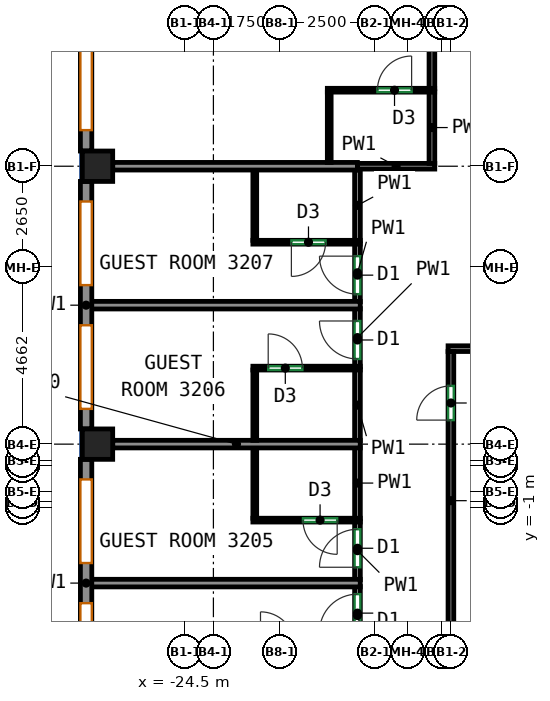
"""IFC4 building model, lengths in metres.
Left out: names, types, materials, properties, quantities, classifications, styles, units other than length and angle.
Written with IfcOpenShell. Run it as: python <this file> out.ifc"""

import sys

from ifc_helpers import new_model, si_unit, direction, frame, frame_2d, origin, origin_2d, place, context, subcontext, project, spatial, rectangle, extrude, source, transform, mapped, element, fill, save


model = new_model("IFC4")
c1 = context("Model", 3, precision=1e-05, world=origin(), true_north=direction((0.0, 1.0)))
c2 = subcontext(c1, "Body", "Model", "MODEL_VIEW")
j1 = project(units=[si_unit("LENGTHUNIT", "METRE"), si_unit("PLANEANGLEUNIT", "RADIAN")], contexts=[c1])
p1 = place(None, origin())
s1 = spatial("IfcSite", under=j1, at=p1, CompositionType="ELEMENT")
p2 = place(p1, origin())
s2 = spatial("IfcBuilding", under=s1, at=p2, CompositionType="ELEMENT")
p3 = place(p2, frame((0.0, 0.0, 143.9)))
s3 = spatial("IfcBuildingStorey", under=s2, at=p3, CompositionType="ELEMENT", Elevation=143.9)
m1 = source(origin(), c2, "Body", "SweptSolid", [
    extrude(rectangle(XDim=0.8, YDim=0.8, at=origin_2d()), origin(), (0.0, 0.0, 1.0), 3.12),
])
for number, where, z_axis, x_axis in (
    (1, (-26.8, 0.688, 0.0), (0.0, 0.0, 1.0), (1.0, 0.0, 0.0)),
    (2, (-26.8, 8.0, 0.0), (0.0, 0.0, 1.0), (1.0, 0.0, 0.0)),
):
    element("IfcColumn", number, at=place(p3, frame(where, z_axis=z_axis, x_axis=x_axis)), inside=s3, PredefinedType="COLUMN", context=c2, shape_type="MappedRepresentation", body=[
        mapped(m1, transform((0.0, 0.0, 0.0))),
    ])
m2 = source(origin(), c2, "Body", "SweptSolid", [
    extrude(rectangle(XDim=13.2, YDim=0.3, at=frame_2d((6.6, 0.0))), origin(), (0.0, 0.0, 1.0), 3.12),
])
p4 = place(p3, frame((-27.1, 21.6, 0.0), z_axis=(0.0, 0.0, 1.0), x_axis=(0.0, -1.0, 0.0)))
e3 = element("IfcWall", 3, at=p4, inside=s3, PredefinedType="SOLIDWALL", context=c2, shape_type="MappedRepresentation", body=[
    mapped(m2, transform((0.0, 0.0, 0.0))),
])
p5 = place(p4, frame((0.55, 0.0, 0.85)))
e4 = element("IfcOpeningElement", 4, at=p5, cuts=e3, PredefinedType="OPENING", context=c2, shape_type="SweptSolid", body=[
    extrude(rectangle(XDim=2.2, YDim=1.95, at=frame_2d((1.1, 0.975))), frame((0.0, 0.16, 0.0), z_axis=(0.0, -1.0, 0.0), x_axis=(1.0, 0.0, 0.0)), (0.0, 0.0, 1.0), 0.32),
])
p6 = place(p4, frame((3.85, 0.0, 0.85)))
e5 = element("IfcOpeningElement", 5, at=p6, cuts=e3, PredefinedType="OPENING", context=c2, shape_type="SweptSolid", body=[
    extrude(rectangle(XDim=2.2, YDim=1.95, at=frame_2d((1.1, 0.975))), frame((0.0, 0.16, 0.0), z_axis=(0.0, -1.0, 0.0), x_axis=(1.0, 0.0, 0.0)), (0.0, 0.0, 1.0), 0.32),
])
p7 = place(p4, frame((7.15, 0.0, 0.85)))
e6 = element("IfcOpeningElement", 6, at=p7, cuts=e3, PredefinedType="OPENING", context=c2, shape_type="SweptSolid", body=[
    extrude(rectangle(XDim=2.2, YDim=1.95, at=frame_2d((1.1, 0.975))), frame((0.0, 0.16, 0.0), z_axis=(0.0, -1.0, 0.0), x_axis=(1.0, 0.0, 0.0)), (0.0, 0.0, 1.0), 0.32),
])
p8 = place(p4, frame((10.45, 0.0, 0.85)))
e7 = element("IfcOpeningElement", 7, at=p8, cuts=e3, PredefinedType="OPENING", context=c2, shape_type="SweptSolid", body=[
    extrude(rectangle(XDim=2.2, YDim=1.95, at=frame_2d((1.1, 0.975))), frame((0.0, 0.16, 0.0), z_axis=(0.0, -1.0, 0.0), x_axis=(1.0, 0.0, 0.0)), (0.0, 0.0, 1.0), 0.32),
])
m3 = source(origin(), c2, "Body", "SweptSolid", [
    extrude(rectangle(XDim=6.513, YDim=0.3, at=frame_2d((3.256, 0.0))), origin(), (0.0, 0.0, 1.0), 3.12),
])
p9 = place(p3, frame((-27.1, 7.6, 0.0), z_axis=(0.0, 0.0, 1.0), x_axis=(0.0, -1.0, 0.0)))
e8 = element("IfcWall", 8, at=p9, inside=s3, PredefinedType="SOLIDWALL", context=c2, shape_type="MappedRepresentation", body=[
    mapped(m3, transform((0.0, 0.0, 0.0))),
])
p10 = place(p9, frame((0.528, 0.0, 0.85)))
e9 = element("IfcOpeningElement", 9, at=p10, cuts=e8, PredefinedType="OPENING", context=c2, shape_type="SweptSolid", body=[
    extrude(rectangle(XDim=2.2, YDim=1.95, at=frame_2d((1.1, 0.975))), frame((0.0, 0.16, 0.0), z_axis=(0.0, -1.0, 0.0), x_axis=(1.0, 0.0, 0.0)), (0.0, 0.0, 1.0), 0.32),
])
p11 = place(p9, frame((3.784, 0.0, 0.85)))
e10 = element("IfcOpeningElement", 10, at=p11, cuts=e8, PredefinedType="OPENING", context=c2, shape_type="SweptSolid", body=[
    extrude(rectangle(XDim=2.2, YDim=1.95, at=frame_2d((1.1, 0.975))), frame((0.0, 0.16, 0.0), z_axis=(0.0, -1.0, 0.0), x_axis=(1.0, 0.0, 0.0)), (0.0, 0.0, 1.0), 0.32),
])
p12 = place(p3, frame((-27.1, 0.288, 0.0), z_axis=(0.0, 0.0, 1.0), x_axis=(0.0, -1.0, 0.0)))
e11 = element("IfcWall", 11, at=p12, inside=s3, PredefinedType="SOLIDWALL", context=c2, shape_type="MappedRepresentation", body=[
    mapped(m3, transform((0.0, 0.0, 0.0))),
])
p13 = place(p12, frame((0.528, 0.0, 0.85)))
e12 = element("IfcOpeningElement", 12, at=p13, cuts=e11, PredefinedType="OPENING", context=c2, shape_type="SweptSolid", body=[
    extrude(rectangle(XDim=2.2, YDim=1.95, at=frame_2d((1.1, 0.975))), frame((0.0, 0.16, 0.0), z_axis=(0.0, -1.0, 0.0), x_axis=(1.0, 0.0, 0.0)), (0.0, 0.0, 1.0), 0.32),
])
p14 = place(p12, frame((3.784, 0.0, 0.85)))
e13 = element("IfcOpeningElement", 13, at=p14, cuts=e11, PredefinedType="OPENING", context=c2, shape_type="SweptSolid", body=[
    extrude(rectangle(XDim=2.2, YDim=1.95, at=frame_2d((1.1, 0.975))), frame((0.0, 0.16, 0.0), z_axis=(0.0, -1.0, 0.0), x_axis=(1.0, 0.0, 0.0)), (0.0, 0.0, 1.0), 0.32),
])
p15 = place(p3, frame((-19.959, -4.585, 0.0), z_axis=(0.0, 0.0, 1.0), x_axis=(0.0, 1.0, 0.0)))
e14 = element("IfcWall", 14, at=p15, inside=s3, PredefinedType="PARTITIONING", context=c2, shape_type="SweptSolid", body=[
    extrude(rectangle(XDim=1.526, YDim=0.15, at=frame_2d((0.763, 0.0))), origin(), (0.0, 0.0, 1.0), 3.12),
])
p16 = place(p15, frame((0.326, 0.0, 0.0)))
e15 = element("IfcOpeningElement", 15, at=p16, cuts=e14, PredefinedType="OPENING", context=c2, shape_type="SweptSolid", body=[
    extrude(rectangle(XDim=1.0, YDim=2.1, at=frame_2d((0.5, 1.05))), frame((0.0, 0.085, 0.0), z_axis=(0.0, -1.0, 0.0), x_axis=(1.0, 0.0, 0.0)), (0.0, 0.0, 1.0), 0.17),
])
p17 = place(p3, frame((-19.959, -2.879, 0.0), z_axis=(0.0, 0.0, 1.0), x_axis=(0.0, 1.0, 0.0)))
e16 = element("IfcWall", 16, at=p17, inside=s3, PredefinedType="PARTITIONING", context=c2, shape_type="SweptSolid", body=[
    extrude(rectangle(XDim=1.527, YDim=0.15, at=frame_2d((0.763, 0.0))), origin(), (0.0, 0.0, 1.0), 3.12),
])
p18 = place(p17, frame((0.327, 0.0, 0.0)))
e17 = element("IfcOpeningElement", 17, at=p18, cuts=e16, PredefinedType="OPENING", context=c2, shape_type="SweptSolid", body=[
    extrude(rectangle(XDim=1.0, YDim=2.1, at=frame_2d((0.5, 1.05))), frame((0.0, 0.085, 0.0), z_axis=(0.0, -1.0, 0.0), x_axis=(1.0, 0.0, 0.0)), (0.0, 0.0, 1.0), 0.17),
])
p19 = place(p3, frame((-19.959, -1.272, 0.0), z_axis=(0.0, 0.0, 1.0), x_axis=(0.0, 1.0, 0.0)))
e18 = element("IfcWall", 18, at=p19, inside=s3, PredefinedType="PARTITIONING", context=c2, shape_type="SweptSolid", body=[
    extrude(rectangle(XDim=1.87, YDim=0.15, at=frame_2d((0.935, 0.0))), origin(), (0.0, 0.0, 1.0), 3.12),
])
p20 = place(p3, frame((-19.959, 2.728, 0.0), z_axis=(0.0, 0.0, 1.0), x_axis=(0.0, 1.0, 0.0)))
e19 = element("IfcWall", 19, at=p20, inside=s3, PredefinedType="PARTITIONING", context=c2, shape_type="SweptSolid", body=[
    extrude(rectangle(XDim=1.526, YDim=0.15, at=frame_2d((0.763, 0.0))), origin(), (0.0, 0.0, 1.0), 3.12),
])
p21 = place(p20, frame((0.2, 0.0, 0.0)))
e20 = element("IfcOpeningElement", 20, at=p21, cuts=e19, PredefinedType="OPENING", context=c2, shape_type="SweptSolid", body=[
    extrude(rectangle(XDim=1.0, YDim=2.1, at=frame_2d((0.5, 1.05))), frame((0.0, 0.085, 0.0), z_axis=(0.0, -1.0, 0.0), x_axis=(1.0, 0.0, 0.0)), (0.0, 0.0, 1.0), 0.17),
])
p22 = place(p3, frame((-19.959, 0.778, 0.0), z_axis=(0.0, 0.0, 1.0), x_axis=(0.0, 1.0, 0.0)))
e21 = element("IfcWall", 21, at=p22, inside=s3, PredefinedType="PARTITIONING", context=c2, shape_type="SweptSolid", body=[
    extrude(rectangle(XDim=1.87, YDim=0.15, at=frame_2d((0.935, 0.0))), origin(), (0.0, 0.0, 1.0), 3.12),
])
p23 = place(p3, frame((-19.959, 4.434, 0.0), z_axis=(0.0, 0.0, 1.0), x_axis=(0.0, 1.0, 0.0)))
e22 = element("IfcWall", 22, at=p23, inside=s3, PredefinedType="PARTITIONING", context=c2, shape_type="SweptSolid", body=[
    extrude(rectangle(XDim=1.526, YDim=0.15, at=frame_2d((0.763, 0.0))), origin(), (0.0, 0.0, 1.0), 3.12),
])
p24 = place(p23, frame((0.2, 0.0, 0.0)))
e23 = element("IfcOpeningElement", 23, at=p24, cuts=e22, PredefinedType="OPENING", context=c2, shape_type="SweptSolid", body=[
    extrude(rectangle(XDim=1.0, YDim=2.1, at=frame_2d((0.5, 1.05))), frame((0.0, 0.085, 0.0), z_axis=(0.0, -1.0, 0.0), x_axis=(1.0, 0.0, 0.0)), (0.0, 0.0, 1.0), 0.17),
])
p25 = place(p3, frame((-19.959, 6.04, 0.0), z_axis=(0.0, 0.0, 1.0), x_axis=(0.0, 1.0, 0.0)))
e24 = element("IfcWall", 24, at=p25, inside=s3, PredefinedType="PARTITIONING", context=c2, shape_type="SweptSolid", body=[
    extrude(rectangle(XDim=1.86, YDim=0.15, at=frame_2d((0.93, 0.0))), origin(), (0.0, 0.0, 1.0), 3.12),
])
p26 = place(p3, frame((-18.0, 10.04, 0.0), z_axis=(0.0, 0.0, 1.0), x_axis=(0.0, 1.0, 0.0)))
e25 = element("IfcWall", 25, at=p26, inside=s3, PredefinedType="PARTITIONING", context=c2, shape_type="SweptSolid", body=[
    extrude(rectangle(XDim=11.885, YDim=0.15, at=frame_2d((5.942, 0.0))), origin(), (0.0, 0.0, 1.0), 3.12),
])
p27 = place(p26, frame((1.309, 0.0, 0.0)))
e26 = element("IfcOpeningElement", 26, at=p27, cuts=e25, PredefinedType="OPENING", context=c2, shape_type="SweptSolid", body=[
    extrude(rectangle(XDim=1.0, YDim=2.1, at=frame_2d((0.5, 1.05))), frame((0.0, 0.085, 0.0), z_axis=(0.0, -1.0, 0.0), x_axis=(1.0, 0.0, 0.0)), (0.0, 0.0, 1.0), 0.17),
])
p28 = place(p3, frame((-17.925, 8.0, 0.0), z_axis=(0.0, 0.0, 1.0), x_axis=(-1.0, 0.0, 0.0)))
e27 = element("IfcWall", 27, at=p28, inside=s3, PredefinedType="PARTITIONING", context=c2, shape_type="SweptSolid", body=[
    extrude(rectangle(XDim=2.034, YDim=0.15, at=frame_2d((1.017, 0.0))), origin(), (0.0, 0.0, 1.0), 3.12),
])
p29 = place(p3, frame((-18.0, 8.075, 0.0), z_axis=(0.0, 0.0, 1.0), x_axis=(0.0, 1.0, 0.0)))
e28 = element("IfcWall", 28, at=p29, inside=s3, PredefinedType="PARTITIONING", context=c2, shape_type="SweptSolid", body=[
    extrude(rectangle(XDim=1.885, YDim=0.15, at=frame_2d((0.942, 0.0))), origin(), (0.0, 0.0, 1.0), 3.12),
])
p30 = place(p3, frame((-17.575, 3.2, 0.0), z_axis=(0.0, 0.0, 1.0), x_axis=(1.0, 0.0, 0.0)))
e29 = element("IfcWall", 29, at=p30, inside=s3, PredefinedType="PARTITIONING", context=c2, shape_type="SweptSolid", body=[
    extrude(rectangle(XDim=3.85, YDim=0.15, at=frame_2d((1.925, 0.0))), origin(), (0.0, 0.0, 1.0), 3.12),
])
p31 = place(p3, frame((-17.5, -4.725, 0.0), z_axis=(0.0, 0.0, 1.0), x_axis=(0.0, 1.0, 0.0)))
e30 = element("IfcWall", 30, at=p31, inside=s3, PredefinedType="PARTITIONING", context=c2, shape_type="SweptSolid", body=[
    extrude(rectangle(XDim=7.85, YDim=0.15, at=frame_2d((3.925, 0.0))), origin(), (0.0, 0.0, 1.0), 3.12),
])
p32 = place(p31, frame((6.045, 0.0, 0.0)))
e31 = element("IfcOpeningElement", 31, at=p32, cuts=e30, PredefinedType="OPENING", context=c2, shape_type="SweptSolid", body=[
    extrude(rectangle(XDim=0.9, YDim=2.1, at=frame_2d((0.45, 1.05))), frame((0.0, 0.085, 0.0), z_axis=(0.0, -1.0, 0.0), x_axis=(1.0, 0.0, 0.0)), (0.0, 0.0, 1.0), 0.17),
])
p33 = place(p3, frame((-19.886, -2.969, 0.0), z_axis=(0.0, 0.0, 1.0), x_axis=(-1.0, 0.0, 0.0)))
e32 = element("IfcWall", 32, at=p33, inside=s3, PredefinedType="PARTITIONING", context=c2, shape_type="SweptSolid", body=[
    extrude(rectangle(XDim=7.114, YDim=0.2, at=frame_2d((3.557, 0.0))), origin(), (0.0, 0.0, 1.0), 3.12),
])
p34 = place(p3, frame((-19.886, -1.312, 0.0), z_axis=(0.0, 0.0, 1.0), x_axis=(-1.0, 0.0, 0.0)))
e33 = element("IfcWall", 33, at=p34, inside=s3, PredefinedType="PARTITIONING", context=c2, shape_type="SweptSolid", body=[
    extrude(rectangle(XDim=2.825, YDim=0.1, at=frame_2d((1.413, 0.0))), origin(), (0.0, 0.0, 1.0), 3.12),
])
p35 = place(p34, frame((0.607, 0.0, 0.0)))
e34 = element("IfcOpeningElement", 34, at=p35, cuts=e33, PredefinedType="OPENING", context=c2, shape_type="SweptSolid", body=[
    extrude(rectangle(XDim=0.9, YDim=2.1, at=frame_2d((0.45, 1.05))), frame((0.0, 0.06, 0.0), z_axis=(0.0, -1.0, 0.0), x_axis=(1.0, 0.0, 0.0)), (0.0, 0.0, 1.0), 0.12),
])
p36 = place(p3, frame((-22.661, -1.262, 0.0), z_axis=(0.0, 0.0, 1.0), x_axis=(0.0, 1.0, 0.0)))
e35 = element("IfcWall", 35, at=p36, inside=s3, PredefinedType="PARTITIONING", context=c2, shape_type="SweptSolid", body=[
    extrude(rectangle(XDim=1.85, YDim=0.1, at=frame_2d((0.925, 0.0))), origin(), (0.0, 0.0, 1.0), 3.12),
])
p37 = place(p3, frame((-26.4, 0.688, 0.0), z_axis=(0.0, 0.0, 1.0), x_axis=(1.0, 0.0, 0.0)))
e36 = element("IfcWall", 36, at=p37, inside=s3, PredefinedType="PARTITIONING", context=c2, shape_type="SweptSolid", body=[
    extrude(rectangle(XDim=6.514, YDim=0.2, at=frame_2d((3.257, 0.0))), origin(), (0.0, 0.0, 1.0), 2.52),
])
p38 = place(p3, frame((-22.711, 2.688, 0.0), z_axis=(0.0, 0.0, 1.0), x_axis=(1.0, 0.0, 0.0)))
e37 = element("IfcWall", 37, at=p38, inside=s3, PredefinedType="PARTITIONING", context=c2, shape_type="SweptSolid", body=[
    extrude(rectangle(XDim=2.825, YDim=0.1, at=frame_2d((1.413, 0.0))), origin(), (0.0, 0.0, 1.0), 3.12),
])
p39 = place(p38, frame((0.403, 0.0, 0.0)))
e38 = element("IfcOpeningElement", 38, at=p39, cuts=e37, PredefinedType="OPENING", context=c2, shape_type="SweptSolid", body=[
    extrude(rectangle(XDim=0.9, YDim=2.1, at=frame_2d((0.45, 1.05))), frame((0.0, 0.06, 0.0), z_axis=(0.0, -1.0, 0.0), x_axis=(1.0, 0.0, 0.0)), (0.0, 0.0, 1.0), 0.12),
])
p40 = place(p3, frame((-22.661, 0.788, 0.0), z_axis=(0.0, 0.0, 1.0), x_axis=(0.0, 1.0, 0.0)))
e39 = element("IfcWall", 39, at=p40, inside=s3, PredefinedType="PARTITIONING", context=c2, shape_type="SweptSolid", body=[
    extrude(rectangle(XDim=1.85, YDim=0.1, at=frame_2d((0.925, 0.0))), origin(), (0.0, 0.0, 1.0), 3.12),
])
p41 = place(p3, frame((-27.0, 4.344, 0.0), z_axis=(0.0, 0.0, 1.0), x_axis=(1.0, 0.0, 0.0)))
e40 = element("IfcWall", 40, at=p41, inside=s3, PredefinedType="PARTITIONING", context=c2, shape_type="SweptSolid", body=[
    extrude(rectangle(XDim=7.114, YDim=0.2, at=frame_2d((3.557, 0.0))), origin(), (0.0, 0.0, 1.0), 3.12),
])
p42 = place(p3, frame((-19.886, 6.0, 0.0), z_axis=(0.0, 0.0, 1.0), x_axis=(-1.0, 0.0, 0.0)))
e41 = element("IfcWall", 41, at=p42, inside=s3, PredefinedType="PARTITIONING", context=c2, shape_type="SweptSolid", body=[
    extrude(rectangle(XDim=2.825, YDim=0.1, at=frame_2d((1.413, 0.0))), origin(), (0.0, 0.0, 1.0), 3.12),
])
p43 = place(p42, frame((0.912, 0.0, 0.0)))
e42 = element("IfcOpeningElement", 42, at=p43, cuts=e41, PredefinedType="OPENING", context=c2, shape_type="SweptSolid", body=[
    extrude(rectangle(XDim=0.9, YDim=2.1, at=frame_2d((0.45, 1.05))), frame((0.0, 0.06, 0.0), z_axis=(0.0, -1.0, 0.0), x_axis=(1.0, 0.0, 0.0)), (0.0, 0.0, 1.0), 0.12),
])
p44 = place(p3, frame((-22.661, 6.05, 0.0), z_axis=(0.0, 0.0, 1.0), x_axis=(0.0, 1.0, 0.0)))
e43 = element("IfcWall", 43, at=p44, inside=s3, PredefinedType="PARTITIONING", context=c2, shape_type="SweptSolid", body=[
    extrude(rectangle(XDim=1.85, YDim=0.1, at=frame_2d((0.925, 0.0))), origin(), (0.0, 0.0, 1.0), 3.12),
])
p45 = place(p3, frame((-26.4, 8.0, 0.0), z_axis=(0.0, 0.0, 1.0), x_axis=(1.0, 0.0, 0.0)))
e44 = element("IfcWall", 44, at=p45, inside=s3, PredefinedType="PARTITIONING", context=c2, shape_type="SweptSolid", body=[
    extrude(rectangle(XDim=6.439, YDim=0.2, at=frame_2d((3.219, 0.0))), origin(), (0.0, 0.0, 1.0), 3.12),
])
p46 = place(p3, frame((-20.752, 10.0, 0.0), z_axis=(0.0, 0.0, 1.0), x_axis=(1.0, 0.0, 0.0)))
e45 = element("IfcWall", 45, at=p46, inside=s3, PredefinedType="PARTITIONING", context=c2, shape_type="SweptSolid", body=[
    extrude(rectangle(XDim=2.825, YDim=0.1, at=frame_2d((1.413, 0.0))), origin(), (0.0, 0.0, 1.0), 3.12),
])
p47 = place(p46, frame((1.318, 0.0, 0.0)))
e46 = element("IfcOpeningElement", 46, at=p47, cuts=e45, PredefinedType="OPENING", context=c2, shape_type="SweptSolid", body=[
    extrude(rectangle(XDim=0.9, YDim=2.1, at=frame_2d((0.45, 1.05))), frame((0.0, 0.06, 0.0), z_axis=(0.0, -1.0, 0.0), x_axis=(1.0, 0.0, 0.0)), (0.0, 0.0, 1.0), 0.12),
])
p48 = place(p3, frame((-20.702, 8.1, 0.0), z_axis=(0.0, 0.0, 1.0), x_axis=(0.0, 1.0, 0.0)))
e47 = element("IfcWall", 47, at=p48, inside=s3, PredefinedType="PARTITIONING", context=c2, shape_type="SweptSolid", body=[
    extrude(rectangle(XDim=1.85, YDim=0.1, at=frame_2d((0.925, 0.0))), origin(), (0.0, 0.0, 1.0), 3.12),
])
p49 = place(p8, origin())
e48 = element("IfcWindow", 48, at=p49, inside=s3, PartitioningType="SINGLE_PANEL", PredefinedType="WINDOW", context=c2, shape_type="SweptSolid", body=[
    extrude(rectangle(XDim=2.2, YDim=1.95, at=frame_2d((1.1, 0.975))), frame((0.0, 0.03, 0.0), z_axis=(0.0, -1.0, 0.0), x_axis=(1.0, 0.0, 0.0)), (0.0, 0.0, 1.0), 0.06),
])
fill(e7, e48)
p50 = place(p10, origin())
e49 = element("IfcWindow", 49, at=p50, inside=s3, PartitioningType="SINGLE_PANEL", PredefinedType="WINDOW", context=c2, shape_type="SweptSolid", body=[
    extrude(rectangle(XDim=2.2, YDim=1.95, at=frame_2d((1.1, 0.975))), frame((0.0, 0.03, 0.0), z_axis=(0.0, -1.0, 0.0), x_axis=(1.0, 0.0, 0.0)), (0.0, 0.0, 1.0), 0.06),
])
fill(e9, e49)
p51 = place(p11, origin())
e50 = element("IfcWindow", 50, at=p51, inside=s3, PartitioningType="SINGLE_PANEL", PredefinedType="WINDOW", context=c2, shape_type="SweptSolid", body=[
    extrude(rectangle(XDim=2.2, YDim=1.95, at=frame_2d((1.1, 0.975))), frame((0.0, 0.03, 0.0), z_axis=(0.0, -1.0, 0.0), x_axis=(1.0, 0.0, 0.0)), (0.0, 0.0, 1.0), 0.06),
])
fill(e10, e50)
p52 = place(p13, origin())
e51 = element("IfcWindow", 51, at=p52, inside=s3, PartitioningType="SINGLE_PANEL", PredefinedType="WINDOW", context=c2, shape_type="SweptSolid", body=[
    extrude(rectangle(XDim=2.2, YDim=1.95, at=frame_2d((1.1, 0.975))), frame((0.0, 0.03, 0.0), z_axis=(0.0, -1.0, 0.0), x_axis=(1.0, 0.0, 0.0)), (0.0, 0.0, 1.0), 0.06),
])
fill(e12, e51)
p53 = place(p14, origin())
e52 = element("IfcWindow", 52, at=p53, inside=s3, PartitioningType="SINGLE_PANEL", PredefinedType="WINDOW", context=c2, shape_type="SweptSolid", body=[
    extrude(rectangle(XDim=2.2, YDim=1.95, at=frame_2d((1.1, 0.975))), frame((0.0, 0.03, 0.0), z_axis=(0.0, -1.0, 0.0), x_axis=(1.0, 0.0, 0.0)), (0.0, 0.0, 1.0), 0.06),
])
fill(e13, e52)
p54 = place(p16, origin())
e53 = element("IfcDoor", 53, at=p54, inside=s3, OperationType="SINGLE_SWING_LEFT", PredefinedType="DOOR", context=c2, shape_type="SweptSolid", body=[
    extrude(rectangle(XDim=1.0, YDim=2.1, at=frame_2d((0.5, 1.05))), frame((0.0, 0.025, 0.0), z_axis=(0.0, -1.0, 0.0), x_axis=(1.0, 0.0, 0.0)), (0.0, 0.0, 1.0), 0.05),
])
fill(e15, e53)
p55 = place(p18, origin())
e54 = element("IfcDoor", 54, at=p55, inside=s3, OperationType="SINGLE_SWING_LEFT", PredefinedType="DOOR", context=c2, shape_type="SweptSolid", body=[
    extrude(rectangle(XDim=1.0, YDim=2.1, at=frame_2d((0.5, 1.05))), frame((0.0, 0.025, 0.0), z_axis=(0.0, -1.0, 0.0), x_axis=(1.0, 0.0, 0.0)), (0.0, 0.0, 1.0), 0.05),
])
fill(e17, e54)
p56 = place(p35, origin())
e55 = element("IfcDoor", 55, at=p56, inside=s3, OperationType="SINGLE_SWING_LEFT", PredefinedType="DOOR", context=c2, shape_type="SweptSolid", body=[
    extrude(rectangle(XDim=0.9, YDim=2.1, at=frame_2d((0.45, 1.05))), frame((0.0, 0.025, 0.0), z_axis=(0.0, -1.0, 0.0), x_axis=(1.0, 0.0, 0.0)), (0.0, 0.0, 1.0), 0.05),
])
fill(e34, e55)
p57 = place(p32, origin())
e56 = element("IfcDoor", 56, at=p57, inside=s3, OperationType="SINGLE_SWING_LEFT", PredefinedType="DOOR", context=c2, shape_type="SweptSolid", body=[
    extrude(rectangle(XDim=0.9, YDim=2.1, at=frame_2d((0.45, 1.05))), frame((0.0, 0.025, 0.0), z_axis=(0.0, -1.0, 0.0), x_axis=(1.0, 0.0, 0.0)), (0.0, 0.0, 1.0), 0.05),
])
fill(e31, e56)
p58 = place(p39, origin())
e57 = element("IfcDoor", 57, at=p58, inside=s3, OperationType="SINGLE_SWING_LEFT", PredefinedType="DOOR", context=c2, shape_type="SweptSolid", body=[
    extrude(rectangle(XDim=0.9, YDim=2.1, at=frame_2d((0.45, 1.05))), frame((0.0, 0.025, 0.0), z_axis=(0.0, -1.0, 0.0), x_axis=(1.0, 0.0, 0.0)), (0.0, 0.0, 1.0), 0.05),
])
fill(e38, e57)
p59 = place(p21, origin())
e58 = element("IfcDoor", 58, at=p59, inside=s3, OperationType="SINGLE_SWING_RIGHT", PredefinedType="DOOR", context=c2, shape_type="SweptSolid", body=[
    extrude(rectangle(XDim=1.0, YDim=2.1, at=frame_2d((0.5, 1.05))), frame((0.0, 0.025, 0.0), z_axis=(0.0, -1.0, 0.0), x_axis=(1.0, 0.0, 0.0)), (0.0, 0.0, 1.0), 0.05),
])
fill(e20, e58)
p60 = place(p24, origin())
e59 = element("IfcDoor", 59, at=p60, inside=s3, OperationType="SINGLE_SWING_RIGHT", PredefinedType="DOOR", context=c2, shape_type="SweptSolid", body=[
    extrude(rectangle(XDim=1.0, YDim=2.1, at=frame_2d((0.5, 1.05))), frame((0.0, 0.025, 0.0), z_axis=(0.0, -1.0, 0.0), x_axis=(1.0, 0.0, 0.0)), (0.0, 0.0, 1.0), 0.05),
])
fill(e23, e59)
p61 = place(p43, origin())
e60 = element("IfcDoor", 60, at=p61, inside=s3, OperationType="SINGLE_SWING_RIGHT", PredefinedType="DOOR", context=c2, shape_type="SweptSolid", body=[
    extrude(rectangle(XDim=0.9, YDim=2.1, at=frame_2d((0.45, 1.05))), frame((0.0, 0.025, 0.0), z_axis=(0.0, -1.0, 0.0), x_axis=(1.0, 0.0, 0.0)), (0.0, 0.0, 1.0), 0.05),
])
fill(e42, e60)
p62 = place(p47, origin())
e61 = element("IfcDoor", 61, at=p62, inside=s3, OperationType="SINGLE_SWING_RIGHT", PredefinedType="DOOR", context=c2, shape_type="SweptSolid", body=[
    extrude(rectangle(XDim=0.9, YDim=2.1, at=frame_2d((0.45, 1.05))), frame((0.0, 0.025, 0.0), z_axis=(0.0, -1.0, 0.0), x_axis=(1.0, 0.0, 0.0)), (0.0, 0.0, 1.0), 0.05),
])
fill(e46, e61)
save(model, sys.argv[1])
